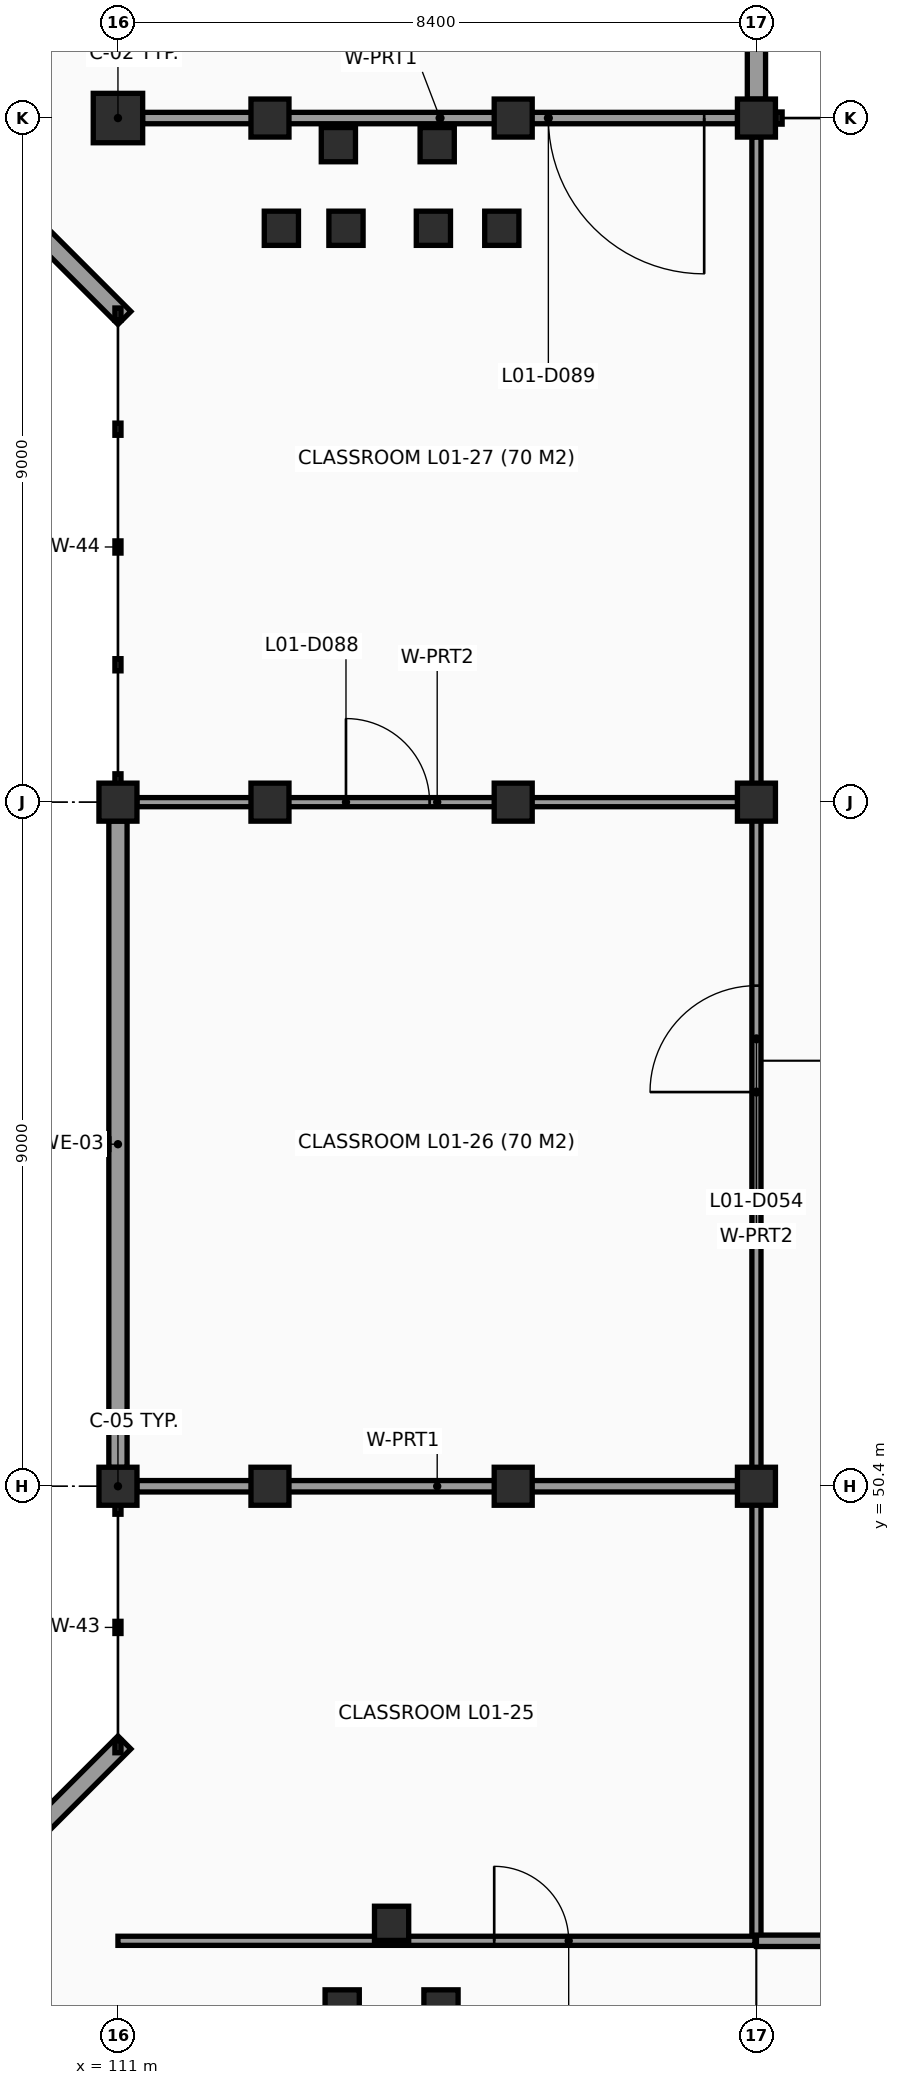
"""IFC4 building model, lengths in metres.
Left out: names, types, materials, properties, quantities, classifications, styles, units other than length and angle.
Written with IfcOpenShell. Run it as: python <this file> out.ifc"""

import sys

from ifc_helpers import new_model, si_unit, direction, frame, frame_2d, origin, origin_2d, place, context, subcontext, project, spatial, rectangle, extrude, element, fill, save


model = new_model("IFC4")
c1 = context("Model", 3, precision=1e-05, world=origin(), true_north=direction((0.0, 1.0)))
c2 = subcontext(c1, "Body", "Model", "MODEL_VIEW")
j1 = project(units=[si_unit("LENGTHUNIT", "METRE"), si_unit("PLANEANGLEUNIT", "RADIAN")], contexts=[c1])
p1 = place(None, origin())
s1 = spatial("IfcSite", under=j1, at=p1, CompositionType="ELEMENT")
p2 = place(p1, origin())
s2 = spatial("IfcBuilding", under=s1, at=p2, CompositionType="ELEMENT")
p3 = place(p2, frame((0.0, 0.0, 4.2)))
s3 = spatial("IfcBuildingStorey", under=s2, at=p3, CompositionType="ELEMENT", Elevation=4.2)
for number, where, z_axis, x_axis in (
    (1, (111.0, 50.4, 0.0), (0.0, 0.0, 1.0), (1.0, 0.0, 0.0)),
    (2, (111.0, 59.4, 0.0), (0.0, 0.0, 1.0), (1.0, 0.0, 0.0)),
):
    element("IfcColumn", number, at=place(p3, frame(where, z_axis=z_axis, x_axis=x_axis)), inside=s3, PredefinedType="COLUMN", context=c2, shape_type="SweptSolid", body=[
        extrude(rectangle(XDim=0.5, YDim=0.5, at=origin_2d()), origin(), (0.0, 0.0, 1.0), 3.6),
    ])
p4 = place(p3, frame((111.0, 68.4, 0.0), z_axis=(0.0, 0.0, 1.0), x_axis=(1.0, 0.0, 0.0)))
e3 = element("IfcColumn", 3, at=p4, inside=s3, PredefinedType="COLUMN", context=c2, shape_type="SweptSolid", body=[
    extrude(rectangle(XDim=0.65, YDim=0.65, at=origin_2d()), origin(), (0.0, 0.0, 1.0), 3.6),
])
for number, where, z_axis, x_axis in (
    (4, (119.4, 50.4, 0.0), (0.0, 0.0, 1.0), (1.0, 0.0, 0.0)),
    (5, (119.4, 59.4, 0.0), (0.0, 0.0, 1.0), (1.0, 0.0, 0.0)),
    (6, (119.4, 68.4, 0.0), (0.0, 0.0, 1.0), (1.0, 0.0, 0.0)),
    (7, (116.2, 50.4, 0.0), (0.0, 0.0, 1.0), (1.0, 0.0, 0.0)),
    (8, (116.2, 59.4, 0.0), (0.0, 0.0, 1.0), (1.0, 0.0, 0.0)),
    (9, (116.2, 68.4, 0.0), (0.0, 0.0, 1.0), (1.0, 0.0, 0.0)),
    (10, (113.0, 50.4, 0.0), (0.0, 0.0, 1.0), (1.0, 0.0, 0.0)),
    (11, (113.0, 59.4, 0.0), (0.0, 0.0, 1.0), (1.0, 0.0, 0.0)),
    (12, (113.0, 68.4, 0.0), (0.0, 0.0, 1.0), (1.0, 0.0, 0.0)),
):
    element("IfcColumn", number, at=place(p3, frame(where, z_axis=z_axis, x_axis=x_axis)), inside=s3, PredefinedType="COLUMN", context=c2, shape_type="SweptSolid", body=[
        extrude(rectangle(XDim=0.5, YDim=0.5, at=origin_2d()), origin(), (0.0, 0.0, 1.0), 3.6),
    ])
for number, where, z_axis, x_axis in (
    (13, (113.95, 43.55, 0.0), (0.0, 0.0, 1.0), (1.0, 0.0, 0.0)),
    (14, (115.25, 43.55, 0.0), (0.0, 0.0, 1.0), (1.0, 0.0, 0.0)),
    (15, (114.6, 44.65, 0.0), (0.0, 0.0, 1.0), (1.0, 0.0, 0.0)),
    (16, (115.15, 66.95, 0.0), (0.0, 0.0, 1.0), (1.0, 0.0, 0.0)),
    (17, (116.05, 66.95, 0.0), (0.0, 0.0, 1.0), (1.0, 0.0, 0.0)),
    (18, (115.2, 68.05, 0.0), (0.0, 0.0, 1.0), (1.0, 0.0, 0.0)),
    (19, (113.15, 66.95, 0.0), (0.0, 0.0, 1.0), (1.0, 0.0, 0.0)),
    (20, (114.0, 66.95, 0.0), (0.0, 0.0, 1.0), (1.0, 0.0, 0.0)),
    (21, (113.9, 68.05, 0.0), (0.0, 0.0, 1.0), (1.0, 0.0, 0.0)),
):
    element("IfcColumn", number, at=place(p3, frame(where, z_axis=z_axis, x_axis=x_axis)), inside=s3, PredefinedType="COLUMN", context=c2, shape_type="SweptSolid", body=[
        extrude(rectangle(XDim=0.45, YDim=0.45, at=origin_2d()), origin(), (0.0, 0.0, 1.0), 3.6),
    ])
p5 = place(p3, frame((119.4, 71.077, 0.0), z_axis=(0.0, 0.0, 1.0), x_axis=(0.0, -1.0, 0.0)))
e22 = element("IfcWall", 22, at=p5, inside=s3, PredefinedType="SOLIDWALL", context=c2, shape_type="SweptSolid", body=[
    extrude(rectangle(XDim=2.429, YDim=0.24, at=frame_2d((1.214, 0.0))), origin(), (0.0, 0.0, 1.0), 2.58),
])
p6 = place(p3, frame((105.371, 41.315, 0.0), z_axis=(0.0, 0.0, 1.0), x_axis=(0.707121887885, 0.707091674165, 0.0)))
e23 = element("IfcWall", 23, at=p6, inside=s3, PredefinedType="SOLIDWALL", context=c2, shape_type="SweptSolid", body=[
    extrude(rectangle(XDim=8.081, YDim=0.24, at=frame_2d((4.04, 0.0))), origin(), (0.0, 0.0, 1.0), 2.72),
])
p7 = place(p6, frame((2.54, 0.0, 0.95)))
e24 = element("IfcOpeningElement", 24, at=p7, cuts=e23, PredefinedType="OPENING", context=c2, shape_type="SweptSolid", body=[
    extrude(rectangle(XDim=3.0, YDim=1.2, at=frame_2d((1.5, 0.6))), frame((0.0, 0.13, 0.0), z_axis=(0.0, -1.0, 0.0), x_axis=(1.0, 0.0, 0.0)), (0.0, 0.0, 1.0), 0.26),
])
p8 = place(p3, frame((111.0, 50.648, 0.0), z_axis=(0.0, 0.0, 1.0), x_axis=(0.0, 1.0, 0.0)))
e25 = element("IfcWall", 25, at=p8, inside=s3, PredefinedType="SOLIDWALL", context=c2, shape_type="SweptSolid", body=[
    extrude(rectangle(XDim=8.504, YDim=0.24, at=frame_2d((4.252, 0.0))), origin(), (0.0, 0.0, 1.0), 2.62),
])
p9 = place(p3, frame((111.085, 65.771, 0.0), z_axis=(0.0, 0.0, 1.0), x_axis=(-0.707106781187, 0.707106781187, 0.0)))
e26 = element("IfcWall", 26, at=p9, inside=s3, PredefinedType="SOLIDWALL", context=c2, shape_type="SweptSolid", body=[
    extrude(rectangle(XDim=8.081, YDim=0.24, at=frame_2d((4.04, 0.0))), origin(), (0.0, 0.0, 1.0), 2.52),
])
p10 = place(p3, frame((119.4, 44.42, 0.0), z_axis=(0.0, 0.0, 1.0), x_axis=(0.0, 1.0, 0.0)))
e27 = element("IfcWall", 27, at=p10, inside=s3, PredefinedType="PARTITIONING", context=c2, shape_type="SweptSolid", body=[
    extrude(rectangle(XDim=23.732, YDim=0.12, at=frame_2d((11.866, 0.0))), origin(), (0.0, 0.0, 1.0), 2.88),
])
p11 = place(p10, frame((11.166, 0.0, 0.0)))
e28 = element("IfcOpeningElement", 28, at=p11, cuts=e27, PredefinedType="OPENING", context=c2, shape_type="SweptSolid", body=[
    extrude(rectangle(XDim=1.4, YDim=2.2, at=frame_2d((0.7, 1.1))), frame((0.0, 0.07, 0.0), z_axis=(0.0, -1.0, 0.0), x_axis=(1.0, 0.0, 0.0)), (0.0, 0.0, 1.0), 0.14),
])
p12 = place(p3, frame((141.843, 44.42, 0.0), z_axis=(0.0, 0.0, 1.0), x_axis=(-1.0, 0.0, 0.0)))
e29 = element("IfcWall", 29, at=p12, inside=s3, PredefinedType="PARTITIONING", context=c2, shape_type="SweptSolid", body=[
    extrude(rectangle(XDim=22.443, YDim=0.15, at=frame_2d((11.221, 0.0))), origin(), (0.0, 0.0, 1.0), 2.88),
])
p13 = place(p3, frame((119.38, 44.42, 0.0), z_axis=(0.0, 0.0, 1.0), x_axis=(-1.0, 0.0, 0.0)))
e30 = element("IfcWall", 30, at=p13, inside=s3, PredefinedType="PARTITIONING", context=c2, shape_type="SweptSolid", body=[
    extrude(rectangle(XDim=8.38, YDim=0.12, at=frame_2d((4.19, 0.0))), origin(), (0.0, 0.0, 1.0), 2.72),
])
p14 = place(p13, frame((2.45, 0.0, 0.0)))
e31 = element("IfcOpeningElement", 31, at=p14, cuts=e30, PredefinedType="OPENING", context=c2, shape_type="SweptSolid", body=[
    extrude(rectangle(XDim=0.98, YDim=2.12, at=frame_2d((0.49, 1.06))), frame((0.0, 0.07, 0.0), z_axis=(0.0, -1.0, 0.0), x_axis=(1.0, 0.0, 0.0)), (0.0, 0.0, 1.0), 0.14),
])
p15 = place(p3, frame((111.248, 50.4, 0.0), z_axis=(0.0, 0.0, 1.0), x_axis=(1.0, 0.0, 0.0)))
e32 = element("IfcWall", 32, at=p15, inside=s3, PredefinedType="PARTITIONING", context=c2, shape_type="SweptSolid", body=[
    extrude(rectangle(XDim=7.904, YDim=0.15, at=frame_2d((3.952, 0.0))), origin(), (0.0, 0.0, 1.0), 2.89),
])
p16 = place(p3, frame((111.248, 59.4, 0.0), z_axis=(0.0, 0.0, 1.0), x_axis=(1.0, 0.0, 0.0)))
e33 = element("IfcWall", 33, at=p16, inside=s3, PredefinedType="PARTITIONING", context=c2, shape_type="SweptSolid", body=[
    extrude(rectangle(XDim=7.904, YDim=0.12, at=frame_2d((3.952, 0.0))), origin(), (0.0, 0.0, 1.0), 2.53),
])
p17 = place(p16, frame((2.752, 0.0, 0.0)))
e34 = element("IfcOpeningElement", 34, at=p17, cuts=e33, PredefinedType="OPENING", context=c2, shape_type="SweptSolid", body=[
    extrude(rectangle(XDim=1.1, YDim=2.1, at=frame_2d((0.55, 1.05))), frame((0.0, 0.07, 0.0), z_axis=(0.0, -1.0, 0.0), x_axis=(1.0, 0.0, 0.0)), (0.0, 0.0, 1.0), 0.14),
])
p18 = place(p3, frame((111.323, 68.4, 0.0), z_axis=(0.0, 0.0, 1.0), x_axis=(1.0, 0.0, 0.0)))
e35 = element("IfcWall", 35, at=p18, inside=s3, PredefinedType="PARTITIONING", context=c2, shape_type="SweptSolid", body=[
    extrude(rectangle(XDim=7.829, YDim=0.15, at=frame_2d((3.915, 0.0))), origin(), (0.0, 0.0, 1.0), 2.63),
])
p19 = place(p18, frame((5.34, 0.0, 0.0)))
e36 = element("IfcOpeningElement", 36, at=p19, cuts=e35, PredefinedType="OPENING", context=c2, shape_type="SweptSolid", body=[
    extrude(rectangle(XDim=2.05, YDim=2.35, at=frame_2d((1.025, 1.175))), frame((0.0, 0.085, 0.0), z_axis=(0.0, -1.0, 0.0), x_axis=(1.0, 0.0, 0.0)), (0.0, 0.0, 1.0), 0.17),
])
p20 = place(p11, origin())
e37 = element("IfcDoor", 37, at=p20, inside=s3, OperationType="SINGLE_SWING_LEFT", PredefinedType="DOOR", context=c2, shape_type="SweptSolid", body=[
    extrude(rectangle(XDim=1.4, YDim=2.2, at=frame_2d((0.7, 1.1))), frame((0.0, 0.025, 0.0), z_axis=(0.0, -1.0, 0.0), x_axis=(1.0, 0.0, 0.0)), (0.0, 0.0, 1.0), 0.05),
])
fill(e28, e37)
p21 = place(p14, origin())
e38 = element("IfcDoor", 38, at=p21, inside=s3, OperationType="SINGLE_SWING_RIGHT", PredefinedType="DOOR", context=c2, shape_type="SweptSolid", body=[
    extrude(rectangle(XDim=0.98, YDim=2.12, at=frame_2d((0.49, 1.06))), frame((0.0, 0.025, 0.0), z_axis=(0.0, -1.0, 0.0), x_axis=(1.0, 0.0, 0.0)), (0.0, 0.0, 1.0), 0.05),
])
fill(e31, e38)
p22 = place(p17, origin())
e39 = element("IfcDoor", 39, at=p22, inside=s3, OperationType="SINGLE_SWING_LEFT", PredefinedType="DOOR", context=c2, shape_type="SweptSolid", body=[
    extrude(rectangle(XDim=1.1, YDim=2.1, at=frame_2d((0.55, 1.05))), frame((0.0, 0.025, 0.0), z_axis=(0.0, -1.0, 0.0), x_axis=(1.0, 0.0, 0.0)), (0.0, 0.0, 1.0), 0.05),
])
fill(e34, e39)
p23 = place(p19, origin())
e40 = element("IfcDoor", 40, at=p23, inside=s3, OperationType="DOUBLE_DOOR_SINGLE_SWING", PredefinedType="DOOR", context=c2, shape_type="SweptSolid", body=[
    extrude(rectangle(XDim=2.05, YDim=2.35, at=frame_2d((1.025, 1.175))), frame((0.0, 0.025, 0.0), z_axis=(0.0, -1.0, 0.0), x_axis=(1.0, 0.0, 0.0)), (0.0, 0.0, 1.0), 0.05),
])
fill(e36, e40)
save(model, sys.argv[1])
